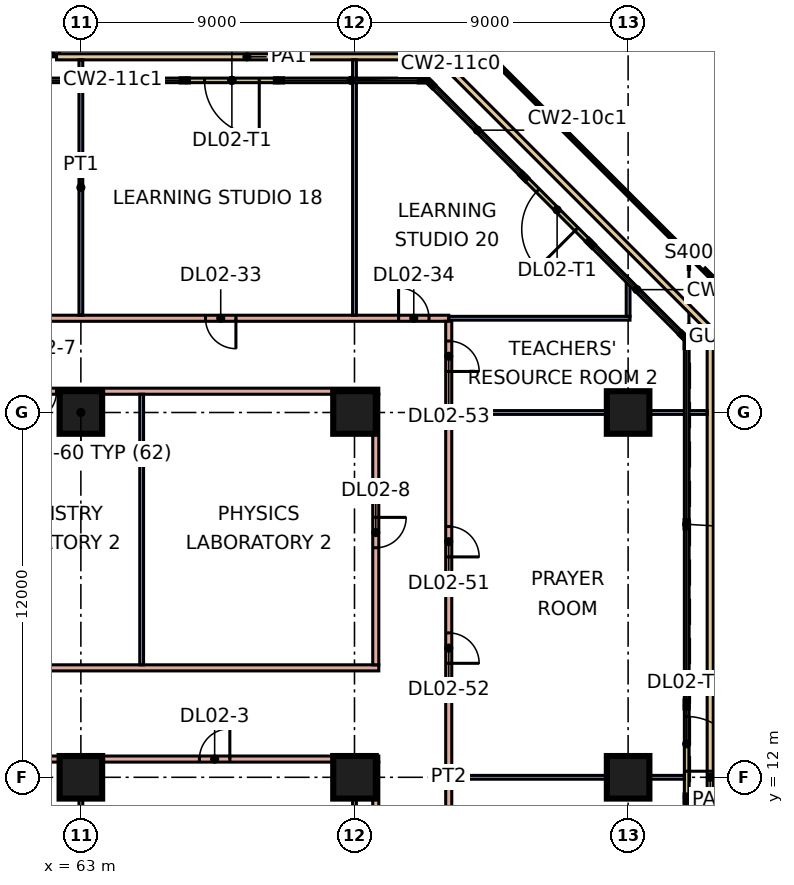
"""IFC4 building model, lengths in metres.
Left out: names, types, materials, properties, quantities, classifications, styles, units other than length and angle.
Written with IfcOpenShell. Run it as: python <this file> out.ifc"""

import sys

from ifc_helpers import new_model, si_unit, direction, frame, frame_2d, origin, origin_2d, place, context, subcontext, project, spatial, rectangle, extrude, element, fill, save


model = new_model("IFC4")
c1 = context("Model", 3, precision=1e-05, world=origin(), true_north=direction((0.0, 1.0)))
c2 = subcontext(c1, "Body", "Model", "MODEL_VIEW")
j1 = project(units=[si_unit("LENGTHUNIT", "METRE"), si_unit("PLANEANGLEUNIT", "RADIAN")], contexts=[c1])
p1 = place(None, origin())
s1 = spatial("IfcSite", under=j1, at=p1, CompositionType="ELEMENT")
p2 = place(p1, origin())
s2 = spatial("IfcBuilding", under=s1, at=p2, CompositionType="ELEMENT")
p3 = place(p2, frame((0.0, 0.0, 12.0)))
s3 = spatial("IfcBuildingStorey", under=s2, at=p3, CompositionType="ELEMENT", Elevation=12.0)
for number, where, z_axis, x_axis in (
    (1, (63.0, 12.0, 0.0), (0.0, 0.0, 1.0), (1.0, 0.0, 0.0)),
    (2, (72.0, 12.0, 0.0), (0.0, 0.0, 1.0), (1.0, 0.0, 0.0)),
    (3, (81.0, 12.0, 0.0), (0.0, 0.0, 1.0), (1.0, 0.0, 0.0)),
    (4, (63.0, 24.0, 0.0), (0.0, 0.0, 1.0), (1.0, 0.0, 0.0)),
    (5, (72.0, 24.0, 0.0), (0.0, 0.0, 1.0), (1.0, 0.0, 0.0)),
    (6, (81.0, 24.0, 0.0), (0.0, 0.0, 1.0), (1.0, 0.0, 0.0)),
):
    element("IfcColumn", number, at=place(p3, frame(where, z_axis=z_axis, x_axis=x_axis)), inside=s3, PredefinedType="COLUMN", context=c2, shape_type="SweptSolid", body=[
        extrude(rectangle(XDim=1.4, YDim=1.4, at=origin_2d()), origin(), (0.0, 0.0, 1.0), 4.8),
    ])
p4 = place(p3, frame((82.925, 11.35, 0.0), z_axis=(0.0, 0.0, 1.0), x_axis=(0.0, 1.0, 0.0)))
e7 = element("IfcWall", 7, at=p4, inside=s3, PredefinedType="SOLIDWALL", context=c2, shape_type="SweptSolid", body=[
    extrude(rectangle(XDim=3.0, YDim=0.15, at=frame_2d((1.5, 0.0))), origin(), (0.0, 0.0, 1.0), 4.4),
])
p5 = place(p4, frame((0.85, 0.0, 0.0)))
e8 = element("IfcOpeningElement", 8, at=p5, cuts=e7, PredefinedType="OPENING", context=c2, shape_type="SweptSolid", body=[
    extrude(rectangle(XDim=1.8, YDim=2.4, at=frame_2d((0.9, 1.2))), frame((0.0, 0.085, 0.0), z_axis=(0.0, -1.0, 0.0), x_axis=(1.0, 0.0, 0.0)), (0.0, 0.0, 1.0), 0.17),
])
p6 = place(p3, frame((79.725, 29.604, 0.0), z_axis=(0.0, 0.0, 1.0), x_axis=(-0.707106781187, 0.707106781187, 0.0)))
e9 = element("IfcWall", 9, at=p6, inside=s3, PredefinedType="SOLIDWALL", context=c2, shape_type="SweptSolid", body=[
    extrude(rectangle(XDim=3.0, YDim=0.15, at=frame_2d((1.5, 0.0))), origin(), (0.0, 0.0, 1.0), 4.4),
])
p7 = place(p6, frame((0.6, 0.0, 0.0)))
e10 = element("IfcOpeningElement", 10, at=p7, cuts=e9, PredefinedType="OPENING", context=c2, shape_type="SweptSolid", body=[
    extrude(rectangle(XDim=1.8, YDim=2.4, at=frame_2d((0.9, 1.2))), frame((0.0, 0.085, 0.0), z_axis=(0.0, -1.0, 0.0), x_axis=(1.0, 0.0, 0.0)), (0.0, 0.0, 1.0), 0.17),
])
p8 = place(p3, frame((69.468, 34.925, 0.0), z_axis=(0.0, 0.0, 1.0), x_axis=(-1.0, 0.0, 0.0)))
e11 = element("IfcWall", 11, at=p8, inside=s3, PredefinedType="SOLIDWALL", context=c2, shape_type="SweptSolid", body=[
    extrude(rectangle(XDim=3.0, YDim=0.15, at=frame_2d((1.5, 0.0))), origin(), (0.0, 0.0, 1.0), 4.4),
])
p9 = place(p8, frame((0.6, 0.0, 0.0)))
e12 = element("IfcOpeningElement", 12, at=p9, cuts=e11, PredefinedType="OPENING", context=c2, shape_type="SweptSolid", body=[
    extrude(rectangle(XDim=1.8, YDim=2.4, at=frame_2d((0.9, 1.2))), frame((0.0, 0.085, 0.0), z_axis=(0.0, -1.0, 0.0), x_axis=(1.0, 0.0, 0.0)), (0.0, 0.0, 1.0), 0.17),
])
p10 = place(p3, frame((62.2, 62.2, 0.0), z_axis=(0.0, 0.0, 1.0), x_axis=(0.0, -1.0, 0.0)))
e13 = element("IfcWall", 13, at=p10, inside=s3, PredefinedType="PARAPET", context=c2, shape_type="SweptSolid", body=[
    extrude(rectangle(XDim=26.5, YDim=0.2, at=frame_2d((13.25, 0.0))), origin(), (0.0, 0.0, 1.0), 0.5),
])
p11 = place(p3, frame((62.2, 35.7, 0.0), z_axis=(0.0, 0.0, 1.0), x_axis=(1.0, 0.0, 0.0)))
e14 = element("IfcWall", 14, at=p11, inside=s3, PredefinedType="PARAPET", context=c2, shape_type="SweptSolid", body=[
    extrude(rectangle(XDim=12.525, YDim=0.2, at=frame_2d((6.263, 0.0))), origin(), (0.0, 0.0, 1.0), 0.5),
])
p12 = place(p3, frame((74.725, 35.7, 0.0), z_axis=(0.0, 0.0, 1.0), x_axis=(0.707106781187, -0.707106781187, 0.0)))
e15 = element("IfcWall", 15, at=p12, inside=s3, PredefinedType="PARAPET", context=c2, shape_type="SweptSolid", body=[
    extrude(rectangle(XDim=12.692, YDim=0.2, at=frame_2d((6.346, 0.0))), origin(), (0.0, 0.0, 1.0), 0.5),
])
p13 = place(p3, frame((83.7, 26.725, 0.0), z_axis=(0.0, 0.0, 1.0), x_axis=(0.0, -1.0, 0.0)))
e16 = element("IfcWall", 16, at=p13, inside=s3, PredefinedType="PARAPET", context=c2, shape_type="SweptSolid", body=[
    extrude(rectangle(XDim=29.45, YDim=0.2, at=frame_2d((14.725, 0.0))), origin(), (0.0, 0.0, 1.0), 0.5),
])
p14 = place(p3, frame((38.3, 27.1, 0.0), z_axis=(0.0, 0.0, 1.0), x_axis=(1.0, 0.0, 0.0)))
e17 = element("IfcWall", 17, at=p14, inside=s3, PredefinedType="PARTITIONING", context=c2, shape_type="SweptSolid", body=[
    extrude(rectangle(XDim=36.8, YDim=0.2, at=frame_2d((18.4, 0.0))), origin(), (0.0, 0.0, 1.0), 4.4),
])
p15 = place(p14, frame((10.8, 0.0, 0.0)))
e18 = element("IfcOpeningElement", 18, at=p15, cuts=e17, PredefinedType="OPENING", context=c2, shape_type="SweptSolid", body=[
    extrude(rectangle(XDim=1.0, YDim=2.1, at=frame_2d((0.5, 1.05))), frame((0.0, 0.11, 0.0), z_axis=(0.0, -1.0, 0.0), x_axis=(1.0, 0.0, 0.0)), (0.0, 0.0, 1.0), 0.22),
])
p16 = place(p14, frame((19.8, 0.0, 0.0)))
e19 = element("IfcOpeningElement", 19, at=p16, cuts=e17, PredefinedType="OPENING", context=c2, shape_type="SweptSolid", body=[
    extrude(rectangle(XDim=1.0, YDim=2.1, at=frame_2d((0.5, 1.05))), frame((0.0, 0.11, 0.0), z_axis=(0.0, -1.0, 0.0), x_axis=(1.0, 0.0, 0.0)), (0.0, 0.0, 1.0), 0.22),
])
p17 = place(p14, frame((28.8, 0.0, 0.0)))
e20 = element("IfcOpeningElement", 20, at=p17, cuts=e17, PredefinedType="OPENING", context=c2, shape_type="SweptSolid", body=[
    extrude(rectangle(XDim=1.0, YDim=2.1, at=frame_2d((0.5, 1.05))), frame((0.0, 0.11, 0.0), z_axis=(0.0, -1.0, 0.0), x_axis=(1.0, 0.0, 0.0)), (0.0, 0.0, 1.0), 0.22),
])
p18 = place(p14, frame((35.15, 0.0, 0.0)))
e21 = element("IfcOpeningElement", 21, at=p18, cuts=e17, PredefinedType="OPENING", context=c2, shape_type="SweptSolid", body=[
    extrude(rectangle(XDim=1.0, YDim=2.1, at=frame_2d((0.5, 1.05))), frame((0.0, 0.11, 0.0), z_axis=(0.0, -1.0, 0.0), x_axis=(1.0, 0.0, 0.0)), (0.0, 0.0, 1.0), 0.22),
])
p19 = place(p3, frame((40.2, 24.7, 0.0), z_axis=(0.0, 0.0, 1.0), x_axis=(1.0, 0.0, 0.0)))
e22 = element("IfcWall", 22, at=p19, inside=s3, PredefinedType="PARTITIONING", context=c2, shape_type="SweptSolid", body=[
    extrude(rectangle(XDim=32.6, YDim=0.2, at=frame_2d((16.3, 0.0))), origin(), (0.0, 0.0, 1.0), 4.4),
])
p20 = place(p19, frame((2.65, 0.0, 0.0)))
e23 = element("IfcOpeningElement", 23, at=p20, cuts=e22, PredefinedType="OPENING", context=c2, shape_type="SweptSolid", body=[
    extrude(rectangle(XDim=1.0, YDim=2.1, at=frame_2d((0.5, 1.05))), frame((0.0, 0.11, 0.0), z_axis=(0.0, -1.0, 0.0), x_axis=(1.0, 0.0, 0.0)), (0.0, 0.0, 1.0), 0.22),
])
p21 = place(p19, frame((8.85, 0.0, 0.0)))
e24 = element("IfcOpeningElement", 24, at=p21, cuts=e22, PredefinedType="OPENING", context=c2, shape_type="SweptSolid", body=[
    extrude(rectangle(XDim=1.0, YDim=2.1, at=frame_2d((0.5, 1.05))), frame((0.0, 0.11, 0.0), z_axis=(0.0, -1.0, 0.0), x_axis=(1.0, 0.0, 0.0)), (0.0, 0.0, 1.0), 0.22),
])
p22 = place(p19, frame((15.05, 0.0, 0.0)))
e25 = element("IfcOpeningElement", 25, at=p22, cuts=e22, PredefinedType="OPENING", context=c2, shape_type="SweptSolid", body=[
    extrude(rectangle(XDim=1.0, YDim=2.1, at=frame_2d((0.5, 1.05))), frame((0.0, 0.11, 0.0), z_axis=(0.0, -1.0, 0.0), x_axis=(1.0, 0.0, 0.0)), (0.0, 0.0, 1.0), 0.22),
])
p23 = place(p19, frame((21.0, 0.0, 0.0)))
e26 = element("IfcOpeningElement", 26, at=p23, cuts=e22, PredefinedType="OPENING", context=c2, shape_type="SweptSolid", body=[
    extrude(rectangle(XDim=1.0, YDim=2.1, at=frame_2d((0.5, 1.05))), frame((0.0, 0.11, 0.0), z_axis=(0.0, -1.0, 0.0), x_axis=(1.0, 0.0, 0.0)), (0.0, 0.0, 1.0), 0.22),
])
p24 = place(p3, frame((51.225, 15.6, 0.0), z_axis=(0.0, 0.0, 1.0), x_axis=(1.0, 0.0, 0.0)))
e27 = element("IfcWall", 27, at=p24, inside=s3, PredefinedType="PARTITIONING", context=c2, shape_type="SweptSolid", body=[
    extrude(rectangle(XDim=21.575, YDim=0.2, at=frame_2d((10.788, 0.0))), origin(), (0.0, 0.0, 1.0), 4.4),
])
p25 = place(p3, frame((54.0, 12.6, 0.0), z_axis=(0.0, 0.0, 1.0), x_axis=(1.0, 0.0, 0.0)))
e28 = element("IfcWall", 28, at=p25, inside=s3, PredefinedType="PARTITIONING", context=c2, shape_type="SweptSolid", body=[
    extrude(rectangle(XDim=18.8, YDim=0.2, at=frame_2d((9.4, 0.0))), origin(), (0.0, 0.0, 1.0), 4.4),
])
p26 = place(p25, frame((3.9, 0.0, 0.0)))
e29 = element("IfcOpeningElement", 29, at=p26, cuts=e28, PredefinedType="OPENING", context=c2, shape_type="SweptSolid", body=[
    extrude(rectangle(XDim=1.0, YDim=2.1, at=frame_2d((0.5, 1.05))), frame((0.0, 0.11, 0.0), z_axis=(0.0, -1.0, 0.0), x_axis=(1.0, 0.0, 0.0)), (0.0, 0.0, 1.0), 0.22),
])
p27 = place(p25, frame((12.9, 0.0, 0.0)))
e30 = element("IfcOpeningElement", 30, at=p27, cuts=e28, PredefinedType="OPENING", context=c2, shape_type="SweptSolid", body=[
    extrude(rectangle(XDim=1.0, YDim=2.1, at=frame_2d((0.5, 1.05))), frame((0.0, 0.11, 0.0), z_axis=(0.0, -1.0, 0.0), x_axis=(1.0, 0.0, 0.0)), (0.0, 0.0, 1.0), 0.22),
])
p28 = place(p3, frame((63.0, 6.062, 0.0), z_axis=(0.0, 0.0, 1.0), x_axis=(0.0, 1.0, 0.0)))
e31 = element("IfcWall", 31, at=p28, inside=s3, PredefinedType="PARTITIONING", context=c2, shape_type="SweptSolid", body=[
    extrude(rectangle(XDim=6.438, YDim=0.125, at=frame_2d((3.219, 0.0))), origin(), (0.0, 0.0, 1.0), 4.4),
])
p29 = place(p3, frame((63.0, 27.2, 0.0), z_axis=(0.0, 0.0, 1.0), x_axis=(0.0, 1.0, 0.0)))
e32 = element("IfcWall", 32, at=p29, inside=s3, PredefinedType="PARTITIONING", context=c2, shape_type="SweptSolid", body=[
    extrude(rectangle(XDim=8.4, YDim=0.125, at=frame_2d((4.2, 0.0))), origin(), (0.0, 0.0, 1.0), 4.4),
])
p30 = place(p3, frame((65.0, 15.7, 0.0), z_axis=(0.0, 0.0, 1.0), x_axis=(0.0, 1.0, 0.0)))
e33 = element("IfcWall", 33, at=p30, inside=s3, PredefinedType="PARTITIONING", context=c2, shape_type="SweptSolid", body=[
    extrude(rectangle(XDim=8.9, YDim=0.125, at=frame_2d((4.45, 0.0))), origin(), (0.0, 0.0, 1.0), 4.4),
])
p31 = place(p3, frame((72.0, 6.062, 0.0), z_axis=(0.0, 0.0, 1.0), x_axis=(0.0, 1.0, 0.0)))
e34 = element("IfcWall", 34, at=p31, inside=s3, PredefinedType="PARTITIONING", context=c2, shape_type="SweptSolid", body=[
    extrude(rectangle(XDim=6.438, YDim=0.125, at=frame_2d((3.219, 0.0))), origin(), (0.0, 0.0, 1.0), 4.4),
])
p32 = place(p3, frame((72.0, 27.2, 0.0), z_axis=(0.0, 0.0, 1.0), x_axis=(0.0, 1.0, 0.0)))
e35 = element("IfcWall", 35, at=p32, inside=s3, PredefinedType="PARTITIONING", context=c2, shape_type="SweptSolid", body=[
    extrude(rectangle(XDim=8.4, YDim=0.125, at=frame_2d((4.2, 0.0))), origin(), (0.0, 0.0, 1.0), 4.4),
])
p33 = place(p3, frame((72.7, -0.6, 0.0), z_axis=(0.0, 0.0, 1.0), x_axis=(0.0, 1.0, 0.0)))
e36 = element("IfcWall", 36, at=p33, inside=s3, PredefinedType="PARTITIONING", context=c2, shape_type="SweptSolid", body=[
    extrude(rectangle(XDim=13.1, YDim=0.2, at=frame_2d((6.55, 0.0))), origin(), (0.0, 0.0, 1.0), 4.4),
])
p34 = place(p33, frame((6.05, 0.0, 0.0)))
e37 = element("IfcOpeningElement", 37, at=p34, cuts=e36, PredefinedType="OPENING", context=c2, shape_type="SweptSolid", body=[
    extrude(rectangle(XDim=1.0, YDim=2.1, at=frame_2d((0.5, 1.05))), frame((0.0, 0.11, 0.0), z_axis=(0.0, -1.0, 0.0), x_axis=(1.0, 0.0, 0.0)), (0.0, 0.0, 1.0), 0.22),
])
p35 = place(p3, frame((72.7, 15.7, 0.0), z_axis=(0.0, 0.0, 1.0), x_axis=(0.0, 1.0, 0.0)))
e38 = element("IfcWall", 38, at=p35, inside=s3, PredefinedType="PARTITIONING", context=c2, shape_type="SweptSolid", body=[
    extrude(rectangle(XDim=8.9, YDim=0.2, at=frame_2d((4.45, 0.0))), origin(), (0.0, 0.0, 1.0), 4.4),
])
p36 = place(p35, frame((3.85, 0.0, 0.0)))
e39 = element("IfcOpeningElement", 39, at=p36, cuts=e38, PredefinedType="OPENING", context=c2, shape_type="SweptSolid", body=[
    extrude(rectangle(XDim=1.0, YDim=2.1, at=frame_2d((0.5, 1.05))), frame((0.0, 0.11, 0.0), z_axis=(0.0, -1.0, 0.0), x_axis=(1.0, 0.0, 0.0)), (0.0, 0.0, 1.0), 0.22),
])
p37 = place(p3, frame((75.1, -3.0, 0.0), z_axis=(0.0, 0.0, 1.0), x_axis=(0.0, 1.0, 0.0)))
e40 = element("IfcWall", 40, at=p37, inside=s3, PredefinedType="PARTITIONING", context=c2, shape_type="SweptSolid", body=[
    extrude(rectangle(XDim=30.0, YDim=0.2, at=frame_2d((15.0, 0.0))), origin(), (0.0, 0.0, 1.0), 4.4),
])
p38 = place(p37, frame((0.55, 0.0, 0.0)))
e41 = element("IfcOpeningElement", 41, at=p38, cuts=e40, PredefinedType="OPENING", context=c2, shape_type="SweptSolid", body=[
    extrude(rectangle(XDim=1.0, YDim=2.1, at=frame_2d((0.5, 1.05))), frame((0.0, 0.11, 0.0), z_axis=(0.0, -1.0, 0.0), x_axis=(1.0, 0.0, 0.0)), (0.0, 0.0, 1.0), 0.22),
])
p39 = place(p37, frame((8.4, 0.0, 0.0)))
e42 = element("IfcOpeningElement", 42, at=p39, cuts=e40, PredefinedType="OPENING", context=c2, shape_type="SweptSolid", body=[
    extrude(rectangle(XDim=1.0, YDim=2.1, at=frame_2d((0.5, 1.05))), frame((0.0, 0.11, 0.0), z_axis=(0.0, -1.0, 0.0), x_axis=(1.0, 0.0, 0.0)), (0.0, 0.0, 1.0), 0.22),
])
p40 = place(p37, frame((3.15, 0.0, 0.0)))
e43 = element("IfcOpeningElement", 43, at=p40, cuts=e40, PredefinedType="OPENING", context=c2, shape_type="SweptSolid", body=[
    extrude(rectangle(XDim=1.0, YDim=2.1, at=frame_2d((0.5, 1.05))), frame((0.0, 0.11, 0.0), z_axis=(0.0, -1.0, 0.0), x_axis=(1.0, 0.0, 0.0)), (0.0, 0.0, 1.0), 0.22),
])
p41 = place(p37, frame((22.25, 0.0, 0.0)))
e44 = element("IfcOpeningElement", 44, at=p41, cuts=e40, PredefinedType="OPENING", context=c2, shape_type="SweptSolid", body=[
    extrude(rectangle(XDim=1.0, YDim=2.1, at=frame_2d((0.5, 1.05))), frame((0.0, 0.11, 0.0), z_axis=(0.0, -1.0, 0.0), x_axis=(1.0, 0.0, 0.0)), (0.0, 0.0, 1.0), 0.22),
])
p42 = place(p37, frame((18.75, 0.0, 0.0)))
e45 = element("IfcOpeningElement", 45, at=p42, cuts=e40, PredefinedType="OPENING", context=c2, shape_type="SweptSolid", body=[
    extrude(rectangle(XDim=1.0, YDim=2.1, at=frame_2d((0.5, 1.05))), frame((0.0, 0.11, 0.0), z_axis=(0.0, -1.0, 0.0), x_axis=(1.0, 0.0, 0.0)), (0.0, 0.0, 1.0), 0.22),
])
p43 = place(p37, frame((28.35, 0.0, 0.0)))
e46 = element("IfcOpeningElement", 46, at=p43, cuts=e40, PredefinedType="OPENING", context=c2, shape_type="SweptSolid", body=[
    extrude(rectangle(XDim=1.0, YDim=2.1, at=frame_2d((0.5, 1.05))), frame((0.0, 0.11, 0.0), z_axis=(0.0, -1.0, 0.0), x_axis=(1.0, 0.0, 0.0)), (0.0, 0.0, 1.0), 0.22),
])
p44 = place(p3, frame((75.1, 27.1, 0.0), z_axis=(0.0, 0.0, 1.0), x_axis=(1.0, 0.0, 0.0)))
e47 = element("IfcWall", 47, at=p44, inside=s3, PredefinedType="PARTITIONING", context=c2, shape_type="SweptSolid", body=[
    extrude(rectangle(XDim=5.962, YDim=0.125, at=frame_2d((2.981, 0.0))), origin(), (0.0, 0.0, 1.0), 4.4),
])
p45 = place(p3, frame((75.2, 12.0, 0.0), z_axis=(0.0, 0.0, 1.0), x_axis=(1.0, 0.0, 0.0)))
e48 = element("IfcWall", 48, at=p45, inside=s3, PredefinedType="PARTITIONING", context=c2, shape_type="SweptSolid", body=[
    extrude(rectangle(XDim=7.651, YDim=0.125, at=frame_2d((3.826, 0.0))), origin(), (0.0, 0.0, 1.0), 4.4),
])
p46 = place(p3, frame((75.2, 24.0, 0.0), z_axis=(0.0, 0.0, 1.0), x_axis=(1.0, 0.0, 0.0)))
e49 = element("IfcWall", 49, at=p46, inside=s3, PredefinedType="PARTITIONING", context=c2, shape_type="SweptSolid", body=[
    extrude(rectangle(XDim=8.4, YDim=0.125, at=frame_2d((4.2, 0.0))), origin(), (0.0, 0.0, 1.0), 4.4),
])
p47 = place(p3, frame((81.0, 27.162, 0.0), z_axis=(0.0, 0.0, 1.0), x_axis=(0.0, 1.0, 0.0)))
e50 = element("IfcWall", 50, at=p47, inside=s3, PredefinedType="PARTITIONING", context=c2, shape_type="SweptSolid", body=[
    extrude(rectangle(XDim=1.167, YDim=0.125, at=frame_2d((0.583, 0.0))), origin(), (0.0, 0.0, 1.0), 4.4),
])
p48 = place(p5, frame((1.8, 0.0, 0.0), z_axis=(0.0, 0.0, 1.0), x_axis=(-1.0, 0.0, 0.0)))
e51 = element("IfcDoor", 51, at=p48, inside=s3, OperationType="DOUBLE_DOOR_SINGLE_SWING", PredefinedType="DOOR", context=c2, shape_type="SweptSolid", body=[
    extrude(rectangle(XDim=1.8, YDim=2.4, at=frame_2d((0.9, 1.2))), frame((0.0, 0.025, 0.0), z_axis=(0.0, -1.0, 0.0), x_axis=(1.0, 0.0, 0.0)), (0.0, 0.0, 1.0), 0.05),
])
fill(e8, e51)
p49 = place(p7, origin())
e52 = element("IfcDoor", 52, at=p49, inside=s3, OperationType="DOUBLE_DOOR_SINGLE_SWING", PredefinedType="DOOR", context=c2, shape_type="SweptSolid", body=[
    extrude(rectangle(XDim=1.8, YDim=2.4, at=frame_2d((0.9, 1.2))), frame((0.0, 0.025, 0.0), z_axis=(0.0, -1.0, 0.0), x_axis=(1.0, 0.0, 0.0)), (0.0, 0.0, 1.0), 0.05),
])
fill(e10, e52)
p50 = place(p9, origin())
e53 = element("IfcDoor", 53, at=p50, inside=s3, OperationType="DOUBLE_DOOR_SINGLE_SWING", PredefinedType="DOOR", context=c2, shape_type="SweptSolid", body=[
    extrude(rectangle(XDim=1.8, YDim=2.4, at=frame_2d((0.9, 1.2))), frame((0.0, 0.025, 0.0), z_axis=(0.0, -1.0, 0.0), x_axis=(1.0, 0.0, 0.0)), (0.0, 0.0, 1.0), 0.05),
])
fill(e12, e53)
p51 = place(p27, frame((1.0, 0.0, 0.0), z_axis=(0.0, 0.0, 1.0), x_axis=(-1.0, 0.0, 0.0)))
e54 = element("IfcDoor", 54, at=p51, inside=s3, OperationType="SINGLE_SWING_RIGHT", PredefinedType="DOOR", context=c2, shape_type="SweptSolid", body=[
    extrude(rectangle(XDim=1.0, YDim=2.1, at=frame_2d((0.5, 1.05))), frame((0.0, 0.025, 0.0), z_axis=(0.0, -1.0, 0.0), x_axis=(1.0, 0.0, 0.0)), (0.0, 0.0, 1.0), 0.05),
])
fill(e30, e54)
p52 = place(p23, frame((1.0, 0.0, 0.0), z_axis=(0.0, 0.0, 1.0), x_axis=(-1.0, 0.0, 0.0)))
e55 = element("IfcDoor", 55, at=p52, inside=s3, OperationType="SINGLE_SWING_LEFT", PredefinedType="DOOR", context=c2, shape_type="SweptSolid", body=[
    extrude(rectangle(XDim=1.0, YDim=2.1, at=frame_2d((0.5, 1.05))), frame((0.0, 0.025, 0.0), z_axis=(0.0, -1.0, 0.0), x_axis=(1.0, 0.0, 0.0)), (0.0, 0.0, 1.0), 0.05),
])
fill(e26, e55)
p53 = place(p36, origin())
e56 = element("IfcDoor", 56, at=p53, inside=s3, OperationType="SINGLE_SWING_RIGHT", PredefinedType="DOOR", context=c2, shape_type="SweptSolid", body=[
    extrude(rectangle(XDim=1.0, YDim=2.1, at=frame_2d((0.5, 1.05))), frame((0.0, 0.025, 0.0), z_axis=(0.0, -1.0, 0.0), x_axis=(1.0, 0.0, 0.0)), (0.0, 0.0, 1.0), 0.05),
])
fill(e39, e56)
p54 = place(p17, origin())
e57 = element("IfcDoor", 57, at=p54, inside=s3, OperationType="SINGLE_SWING_RIGHT", PredefinedType="DOOR", context=c2, shape_type="SweptSolid", body=[
    extrude(rectangle(XDim=1.0, YDim=2.1, at=frame_2d((0.5, 1.05))), frame((0.0, 0.025, 0.0), z_axis=(0.0, -1.0, 0.0), x_axis=(1.0, 0.0, 0.0)), (0.0, 0.0, 1.0), 0.05),
])
fill(e20, e57)
p55 = place(p18, origin())
e58 = element("IfcDoor", 58, at=p55, inside=s3, OperationType="SINGLE_SWING_LEFT", PredefinedType="DOOR", context=c2, shape_type="SweptSolid", body=[
    extrude(rectangle(XDim=1.0, YDim=2.1, at=frame_2d((0.5, 1.05))), frame((0.0, 0.025, 0.0), z_axis=(0.0, -1.0, 0.0), x_axis=(1.0, 0.0, 0.0)), (0.0, 0.0, 1.0), 0.05),
])
fill(e21, e58)
p56 = place(p41, frame((1.0, 0.0, 0.0), z_axis=(0.0, 0.0, 1.0), x_axis=(-1.0, 0.0, 0.0)))
e59 = element("IfcDoor", 59, at=p56, inside=s3, OperationType="SINGLE_SWING_LEFT", PredefinedType="DOOR", context=c2, shape_type="SweptSolid", body=[
    extrude(rectangle(XDim=1.0, YDim=2.1, at=frame_2d((0.5, 1.05))), frame((0.0, 0.025, 0.0), z_axis=(0.0, -1.0, 0.0), x_axis=(1.0, 0.0, 0.0)), (0.0, 0.0, 1.0), 0.05),
])
fill(e44, e59)
p57 = place(p42, frame((1.0, 0.0, 0.0), z_axis=(0.0, 0.0, 1.0), x_axis=(-1.0, 0.0, 0.0)))
e60 = element("IfcDoor", 60, at=p57, inside=s3, OperationType="SINGLE_SWING_LEFT", PredefinedType="DOOR", context=c2, shape_type="SweptSolid", body=[
    extrude(rectangle(XDim=1.0, YDim=2.1, at=frame_2d((0.5, 1.05))), frame((0.0, 0.025, 0.0), z_axis=(0.0, -1.0, 0.0), x_axis=(1.0, 0.0, 0.0)), (0.0, 0.0, 1.0), 0.05),
])
fill(e45, e60)
p58 = place(p43, frame((1.0, 0.0, 0.0), z_axis=(0.0, 0.0, 1.0), x_axis=(-1.0, 0.0, 0.0)))
e61 = element("IfcDoor", 61, at=p58, inside=s3, OperationType="SINGLE_SWING_LEFT", PredefinedType="DOOR", context=c2, shape_type="SweptSolid", body=[
    extrude(rectangle(XDim=1.0, YDim=2.1, at=frame_2d((0.5, 1.05))), frame((0.0, 0.025, 0.0), z_axis=(0.0, -1.0, 0.0), x_axis=(1.0, 0.0, 0.0)), (0.0, 0.0, 1.0), 0.05),
])
fill(e46, e61)
save(model, sys.argv[1])
